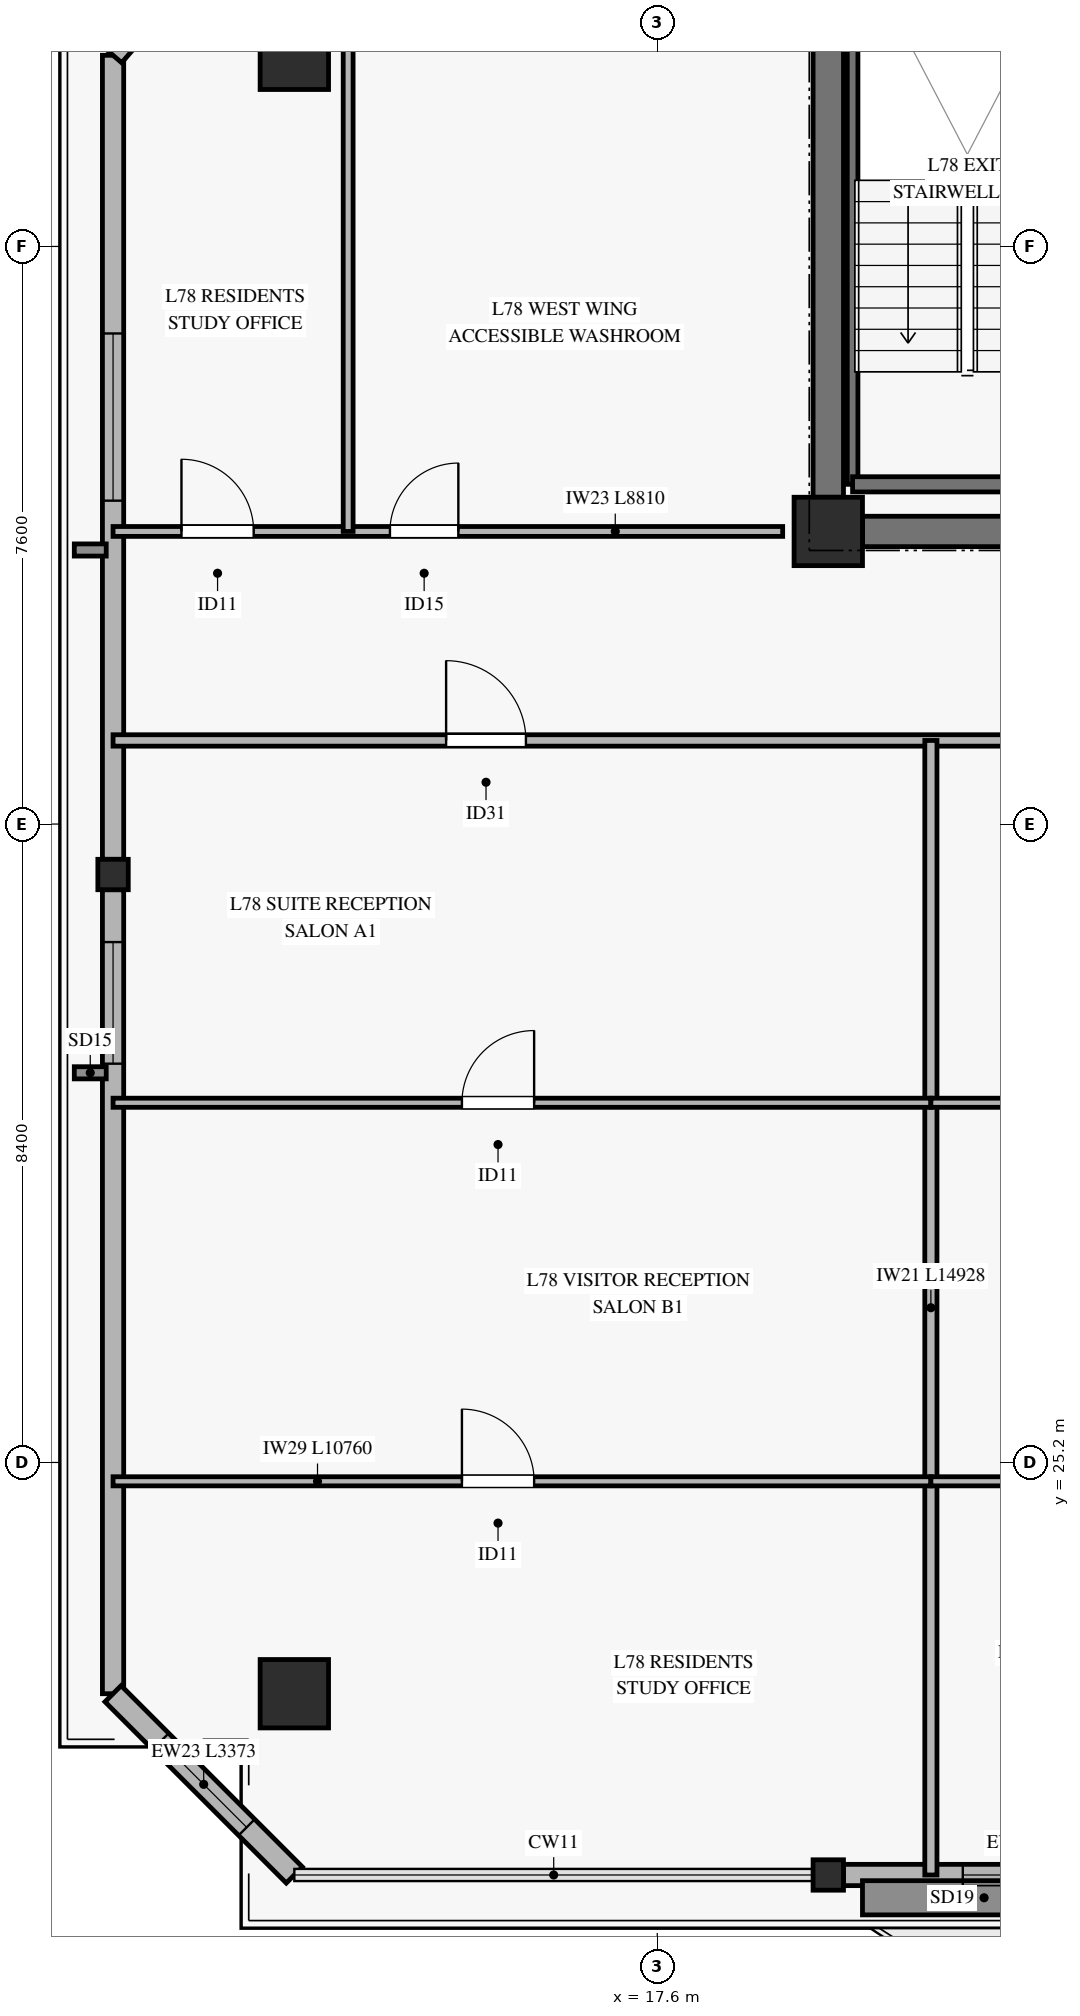
"""IFC4 building model, lengths in metres.
Left out: names, types, materials, properties, quantities, classifications, styles, units other than length and angle.
Written with IfcOpenShell. Run it as: python <this file> out.ifc"""

import sys

from ifc_helpers import new_model, si_unit, direction, frame, frame_2d, origin, origin_2d, place, context, subcontext, project, spatial, rectangle, hollow_rectangle, extrude, source, transform, mapped, element, fill, save


model = new_model("IFC4")
c1 = context("Model", 3, precision=1e-05, world=origin(), true_north=direction((0.0, 1.0)))
c2 = subcontext(c1, "Body", "Model", "MODEL_VIEW")
j1 = project(units=[si_unit("LENGTHUNIT", "METRE"), si_unit("PLANEANGLEUNIT", "RADIAN")], contexts=[c1])
p1 = place(None, origin())
s1 = spatial("IfcSite", under=j1, at=p1, CompositionType="ELEMENT")
p2 = place(p1, origin())
s2 = spatial("IfcBuilding", under=s1, at=p2, CompositionType="ELEMENT")
p3 = place(p2, frame((0.0, 0.0, 304.0)))
s3 = spatial("IfcBuildingStorey", under=s2, at=p3, CompositionType="ELEMENT", Elevation=304.0)
m1 = source(origin(), c2, "Body", "SweptSolid", [
    extrude(rectangle(XDim=0.9, YDim=0.9, at=origin_2d()), origin(), (0.0, 0.0, 1.0), 3.185),
])
p4 = place(p3, frame((19.85, 37.45, 0.0), z_axis=(0.0, 0.0, 1.0), x_axis=(1.0, 0.0, 0.0)))
e1 = element("IfcColumn", 1, at=p4, inside=s3, PredefinedType="PILASTER", context=c2, shape_type="MappedRepresentation", body=[
    mapped(m1, transform((0.0, 0.0, 0.0), x_axis=(1.0, 0.0, 0.0), y_axis=(0.0, 1.0, 0.0), z_axis=(0.0, 0.0, 1.0), scale=1.0)),
])
p5 = place(p3, frame((20.3, 37.45, 0.0), z_axis=(0.0, 0.0, 1.0), x_axis=(1.0, 0.0, 0.0)))
e2 = element("IfcWall", 2, at=p5, inside=s3, PredefinedType="SHEAR", context=c2, shape_type="SweptSolid", body=[
    extrude(rectangle(XDim=10.05, YDim=0.4, at=frame_2d((5.025, 0.0))), origin(), (0.0, 0.0, 1.0), 3.185),
])
p6 = place(p5, frame((4.25, 0.0, 0.0)))
e3 = element("IfcOpeningElement", 3, at=p6, cuts=e2, PredefinedType="OPENING", context=c2, shape_type="SweptSolid", body=[
    extrude(rectangle(XDim=1.2, YDim=2.15, at=frame_2d((0.6, 1.075))), frame((0.0, 0.21, 0.0), z_axis=(0.0, -1.0, 0.0), x_axis=(1.0, 0.0, 0.0)), (0.0, 0.0, 1.0), 0.42),
])
p7 = place(p3, frame((19.85, 37.9, 0.0), z_axis=(0.0, 0.0, 1.0), x_axis=(0.0, 1.0, 0.0)))
e4 = element("IfcWall", 4, at=p7, inside=s3, PredefinedType="SHEAR", context=c2, shape_type="SweptSolid", body=[
    extrude(rectangle(XDim=8.2, YDim=0.4, at=frame_2d((4.1, 0.0))), origin(), (0.0, 0.0, 1.0), 3.185),
])
m2 = source(origin(), c2, "Body", "SweptSolid", [
    extrude(hollow_rectangle(XDim=0.9, YDim=0.9, WallThickness=0.04, at=origin_2d()), origin(), (0.0, 0.0, 1.0), 3.185),
])
for number, where, z_axis, x_axis in (
    (5, (12.825, 22.157, 0.0), (0.0, 0.0, 1.0), (1.0, 0.0, 0.0)),
    (6, (12.825, 43.715, 0.0), (0.0, 0.0, 1.0), (1.0, 0.0, 0.0)),
):
    element("IfcColumn", number, at=place(p3, frame(where, z_axis=z_axis, x_axis=x_axis)), inside=s3, PredefinedType="COLUMN", context=c2, shape_type="MappedRepresentation", body=[
        mapped(m2, transform((0.0, 0.0, 0.0), x_axis=(1.0, 0.0, 0.0), y_axis=(0.0, 1.0, 0.0), z_axis=(0.0, 0.0, 1.0), scale=1.0)),
    ])
m3 = source(origin(), c2, "Body", "SweptSolid", [
    extrude(hollow_rectangle(XDim=0.4, YDim=0.4, WallThickness=0.02, at=origin_2d()), origin(), (0.0, 0.0, 1.0), 3.185),
])
for number, where, z_axis, x_axis in (
    (7, (19.85, 19.772, 0.0), (0.0, 0.0, 1.0), (1.0, 0.0, 0.0)),
    (8, (10.44, 32.936, 0.0), (0.0, 0.0, 1.0), (1.0, 0.0, 0.0)),
):
    element("IfcColumn", number, at=place(p3, frame(where, z_axis=z_axis, x_axis=x_axis)), inside=s3, PredefinedType="COLUMN", context=c2, shape_type="MappedRepresentation", body=[
        mapped(m3, transform((0.0, 0.0, 0.0), x_axis=(1.0, 0.0, 0.0), y_axis=(0.0, 1.0, 0.0), z_axis=(0.0, 0.0, 1.0), scale=1.0)),
    ])
p8 = place(p3, frame((20.05, 19.772, 0.0), z_axis=(0.0, 0.0, 1.0), x_axis=(1.0, 0.0, 0.0)))
e9 = element("IfcWall", 9, at=p8, inside=s3, PredefinedType="SOLIDWALL", context=c2, shape_type="SweptSolid", body=[
    extrude(rectangle(XDim=10.55, YDim=0.28, at=frame_2d((5.275, 0.0))), origin(), (0.0, 0.0, 1.0), 2.815),
])
p9 = place(p8, frame((4.35, 0.0, 0.0)))
e10 = element("IfcOpeningElement", 10, at=p9, cuts=e9, PredefinedType="OPENING", context=c2, shape_type="SweptSolid", body=[
    extrude(rectangle(XDim=1.8, YDim=2.25, at=frame_2d((0.9, 1.125))), frame((0.0, 0.15, 0.0), z_axis=(0.0, -1.0, 0.0), x_axis=(1.0, 0.0, 0.0)), (0.0, 0.0, 1.0), 0.3),
])
p10 = place(p8, frame((1.57, 0.0, 0.45)))
e11 = element("IfcOpeningElement", 11, at=p10, cuts=e9, PredefinedType="OPENING", context=c2, shape_type="SweptSolid", body=[
    extrude(rectangle(XDim=2.2, YDim=2.1, at=frame_2d((1.1, 1.05))), frame((0.0, 0.15, 0.0), z_axis=(0.0, -1.0, 0.0), x_axis=(1.0, 0.0, 0.0)), (0.0, 0.0, 1.0), 0.3),
])
p11 = place(p8, frame((7.35, 0.0, 0.45)))
e12 = element("IfcOpeningElement", 12, at=p11, cuts=e9, PredefinedType="OPENING", context=c2, shape_type="SweptSolid", body=[
    extrude(rectangle(XDim=1.6, YDim=2.0, at=frame_2d((0.8, 1.0))), frame((0.0, 0.15, 0.0), z_axis=(0.0, -1.0, 0.0), x_axis=(1.0, 0.0, 0.0)), (0.0, 0.0, 1.0), 0.3),
])
p12 = place(p3, frame((10.44, 22.157, 0.0), z_axis=(0.0, 0.0, 1.0), x_axis=(0.0, 1.0, 0.0)))
e13 = element("IfcWall", 13, at=p12, inside=s3, PredefinedType="SOLIDWALL", context=c2, shape_type="SweptSolid", body=[
    extrude(rectangle(XDim=10.579, YDim=0.28, at=frame_2d((5.29, 0.0))), origin(), (0.0, 0.0, 1.0), 2.815),
])
p13 = place(p12, frame((8.29, 0.0, 0.45)))
e14 = element("IfcOpeningElement", 14, at=p13, cuts=e13, PredefinedType="OPENING", context=c2, shape_type="SweptSolid", body=[
    extrude(rectangle(XDim=1.6, YDim=2.0, at=frame_2d((0.8, 1.0))), frame((0.0, 0.15, 0.0), z_axis=(0.0, -1.0, 0.0), x_axis=(1.0, 0.0, 0.0)), (0.0, 0.0, 1.0), 0.3),
])
p14 = place(p3, frame((10.44, 33.136, 0.0), z_axis=(0.0, 0.0, 1.0), x_axis=(0.0, 1.0, 0.0)))
e15 = element("IfcWall", 15, at=p14, inside=s3, PredefinedType="SOLIDWALL", context=c2, shape_type="SweptSolid", body=[
    extrude(rectangle(XDim=10.579, YDim=0.28, at=frame_2d((5.29, 0.0))), origin(), (0.0, 0.0, 1.0), 2.815),
])
p15 = place(p14, frame((4.719, 0.0, 0.45)))
e16 = element("IfcOpeningElement", 16, at=p15, cuts=e15, PredefinedType="OPENING", context=c2, shape_type="SweptSolid", body=[
    extrude(rectangle(XDim=2.2, YDim=2.1, at=frame_2d((1.1, 1.05))), frame((0.0, 0.15, 0.0), z_axis=(0.0, -1.0, 0.0), x_axis=(1.0, 0.0, 0.0)), (0.0, 0.0, 1.0), 0.3),
])
p16 = place(p3, frame((10.44, 22.157, 0.0), z_axis=(0.0, 0.0, 1.0), x_axis=(0.707106781187, -0.707106781187, 0.0)))
e17 = element("IfcWall", 17, at=p16, inside=s3, PredefinedType="SOLIDWALL", context=c2, shape_type="SweptSolid", body=[
    extrude(rectangle(XDim=3.373, YDim=0.3, at=frame_2d((1.687, 0.0))), origin(), (0.0, 0.0, 1.0), 2.815),
])
p17 = place(p16, frame((0.886, 0.0, 0.45)))
e18 = element("IfcOpeningElement", 18, at=p17, cuts=e17, PredefinedType="OPENING", context=c2, shape_type="SweptSolid", body=[
    extrude(rectangle(XDim=1.6, YDim=2.0, at=frame_2d((0.8, 1.0))), frame((0.0, 0.16, 0.0), z_axis=(0.0, -1.0, 0.0), x_axis=(1.0, 0.0, 0.0)), (0.0, 0.0, 1.0), 0.32),
])
p18 = place(p3, frame((12.625, 46.25, 0.0), z_axis=(0.0, 0.0, 1.0), x_axis=(-0.652903544361, -0.757441061576, 0.0)))
e19 = element("IfcWall", 19, at=p18, inside=s3, PredefinedType="SOLIDWALL", context=c2, shape_type="SweptSolid", body=[
    extrude(rectangle(XDim=3.347, YDim=0.3, at=frame_2d((1.673, 0.0))), origin(), (0.0, 0.0, 1.0), 2.815),
])
p19 = place(p18, frame((0.873, 0.0, 0.45)))
e20 = element("IfcOpeningElement", 20, at=p19, cuts=e19, PredefinedType="OPENING", context=c2, shape_type="SweptSolid", body=[
    extrude(rectangle(XDim=1.6, YDim=2.0, at=frame_2d((0.8, 1.0))), frame((0.0, 0.16, 0.0), z_axis=(0.0, -1.0, 0.0), x_axis=(1.0, 0.0, 0.0)), (0.0, 0.0, 1.0), 0.32),
])
p20 = place(p3, frame((20.17, 38.07, 0.0), z_axis=(0.0, 0.0, 1.0), x_axis=(0.0, 1.0, 0.0)))
e21 = element("IfcWall", 21, at=p20, inside=s3, PredefinedType="SOLIDWALL", context=c2, shape_type="SweptSolid", body=[
    extrude(rectangle(XDim=7.25, YDim=0.14, at=frame_2d((3.625, 0.0))), origin(), (0.0, 0.0, 1.0), 3.4),
])
p21 = place(p3, frame((20.17, 38.07, 0.0), z_axis=(0.0, 0.0, 1.0), x_axis=(1.0, 0.0, 0.0)))
e22 = element("IfcWall", 22, at=p21, inside=s3, PredefinedType="SOLIDWALL", context=c2, shape_type="SweptSolid", body=[
    extrude(rectangle(XDim=3.05, YDim=0.2, at=frame_2d((1.525, 0.0))), origin(), (0.0, 0.0, 1.0), 3.4),
])
p22 = place(p3, frame((10.44, 34.7, 0.0), z_axis=(0.0, 0.0, 1.0), x_axis=(1.0, 0.0, 0.0)))
e23 = element("IfcWall", 23, at=p22, inside=s3, PredefinedType="PARTITIONING", context=c2, shape_type="SweptSolid", body=[
    extrude(rectangle(XDim=49.52, YDim=0.15, at=frame_2d((24.76, 0.0))), origin(), (0.0, 0.0, 1.0), 2.47),
])
p23 = place(p22, frame((4.382, 0.0, 0.0)))
e24 = element("IfcOpeningElement", 24, at=p23, cuts=e23, PredefinedType="OPENING", context=c2, shape_type="SweptSolid", body=[
    extrude(rectangle(XDim=1.05, YDim=2.15, at=frame_2d((0.525, 1.075))), frame((0.0, 0.085, 0.0), z_axis=(0.0, -1.0, 0.0), x_axis=(1.0, 0.0, 0.0)), (0.0, 0.0, 1.0), 0.17),
])
p24 = place(p22, frame((15.945, 0.0, 0.0)))
e25 = element("IfcOpeningElement", 25, at=p24, cuts=e23, PredefinedType="OPENING", context=c2, shape_type="SweptSolid", body=[
    extrude(rectangle(XDim=1.05, YDim=2.15, at=frame_2d((0.525, 1.075))), frame((0.0, 0.085, 0.0), z_axis=(0.0, -1.0, 0.0), x_axis=(1.0, 0.0, 0.0)), (0.0, 0.0, 1.0), 0.17),
])
p25 = place(p22, frame((28.233, 0.0, 0.0)))
e26 = element("IfcOpeningElement", 26, at=p25, cuts=e23, PredefinedType="OPENING", context=c2, shape_type="SweptSolid", body=[
    extrude(rectangle(XDim=1.05, YDim=2.15, at=frame_2d((0.525, 1.075))), frame((0.0, 0.085, 0.0), z_axis=(0.0, -1.0, 0.0), x_axis=(1.0, 0.0, 0.0)), (0.0, 0.0, 1.0), 0.17),
])
p26 = place(p22, frame((40.462, 0.0, 0.0)))
e27 = element("IfcOpeningElement", 27, at=p26, cuts=e23, PredefinedType="OPENING", context=c2, shape_type="SweptSolid", body=[
    extrude(rectangle(XDim=1.05, YDim=2.15, at=frame_2d((0.525, 1.075))), frame((0.0, 0.085, 0.0), z_axis=(0.0, -1.0, 0.0), x_axis=(1.0, 0.0, 0.0)), (0.0, 0.0, 1.0), 0.17),
])
p27 = place(p3, frame((21.2, 19.772, 0.0), z_axis=(0.0, 0.0, 1.0), x_axis=(0.0, 1.0, 0.0)))
e28 = element("IfcWall", 28, at=p27, inside=s3, PredefinedType="PARTITIONING", context=c2, shape_type="SweptSolid", body=[
    extrude(rectangle(XDim=14.928, YDim=0.16, at=frame_2d((7.464, 0.0))), origin(), (0.0, 0.0, 1.0), 2.77),
])
p28 = place(p3, frame((10.44, 24.952, 0.0), z_axis=(0.0, 0.0, 1.0), x_axis=(1.0, 0.0, 0.0)))
e29 = element("IfcWall", 29, at=p28, inside=s3, PredefinedType="PARTITIONING", context=c2, shape_type="SweptSolid", body=[
    extrude(rectangle(XDim=10.76, YDim=0.12, at=frame_2d((5.38, 0.0))), origin(), (0.0, 0.0, 1.0), 2.47),
])
p29 = place(p28, frame((4.59, 0.0, 0.0)))
e30 = element("IfcOpeningElement", 30, at=p29, cuts=e29, PredefinedType="OPENING", context=c2, shape_type="SweptSolid", body=[
    extrude(rectangle(XDim=0.95, YDim=2.1, at=frame_2d((0.475, 1.05))), frame((0.0, 0.07, 0.0), z_axis=(0.0, -1.0, 0.0), x_axis=(1.0, 0.0, 0.0)), (0.0, 0.0, 1.0), 0.14),
])
p30 = place(p3, frame((10.44, 29.933, 0.0), z_axis=(0.0, 0.0, 1.0), x_axis=(1.0, 0.0, 0.0)))
e31 = element("IfcWall", 31, at=p30, inside=s3, PredefinedType="PARTITIONING", context=c2, shape_type="SweptSolid", body=[
    extrude(rectangle(XDim=10.76, YDim=0.12, at=frame_2d((5.38, 0.0))), origin(), (0.0, 0.0, 1.0), 2.47),
])
p31 = place(p30, frame((4.59, 0.0, 0.0)))
e32 = element("IfcOpeningElement", 32, at=p31, cuts=e31, PredefinedType="OPENING", context=c2, shape_type="SweptSolid", body=[
    extrude(rectangle(XDim=0.95, YDim=2.1, at=frame_2d((0.475, 1.05))), frame((0.0, 0.07, 0.0), z_axis=(0.0, -1.0, 0.0), x_axis=(1.0, 0.0, 0.0)), (0.0, 0.0, 1.0), 0.14),
])
p32 = place(p3, frame((21.2, 24.952, 0.0), z_axis=(0.0, 0.0, 1.0), x_axis=(1.0, 0.0, 0.0)))
e33 = element("IfcWall", 33, at=p32, inside=s3, PredefinedType="PARTITIONING", context=c2, shape_type="SweptSolid", body=[
    extrude(rectangle(XDim=13.2, YDim=0.12, at=frame_2d((6.6, 0.0))), origin(), (0.0, 0.0, 1.0), 2.47),
])
p33 = place(p32, frame((5.446, 0.0, 0.0)))
e34 = element("IfcOpeningElement", 34, at=p33, cuts=e33, PredefinedType="OPENING", context=c2, shape_type="SweptSolid", body=[
    extrude(rectangle(XDim=0.95, YDim=2.1, at=frame_2d((0.475, 1.05))), frame((0.0, 0.07, 0.0), z_axis=(0.0, -1.0, 0.0), x_axis=(1.0, 0.0, 0.0)), (0.0, 0.0, 1.0), 0.14),
])
p34 = place(p3, frame((21.2, 29.933, 0.0), z_axis=(0.0, 0.0, 1.0), x_axis=(1.0, 0.0, 0.0)))
e35 = element("IfcWall", 35, at=p34, inside=s3, PredefinedType="PARTITIONING", context=c2, shape_type="SweptSolid", body=[
    extrude(rectangle(XDim=13.2, YDim=0.12, at=frame_2d((6.6, 0.0))), origin(), (0.0, 0.0, 1.0), 2.47),
])
p35 = place(p34, frame((5.446, 0.0, 0.0)))
e36 = element("IfcOpeningElement", 36, at=p35, cuts=e35, PredefinedType="OPENING", context=c2, shape_type="SweptSolid", body=[
    extrude(rectangle(XDim=0.95, YDim=2.1, at=frame_2d((0.475, 1.05))), frame((0.0, 0.07, 0.0), z_axis=(0.0, -1.0, 0.0), x_axis=(1.0, 0.0, 0.0)), (0.0, 0.0, 1.0), 0.14),
])
p36 = place(p3, frame((10.44, 37.45, 0.0), z_axis=(0.0, 0.0, 1.0), x_axis=(1.0, 0.0, 0.0)))
e37 = element("IfcWall", 37, at=p36, inside=s3, PredefinedType="PARTITIONING", context=c2, shape_type="SweptSolid", body=[
    extrude(rectangle(XDim=8.81, YDim=0.13, at=frame_2d((4.405, 0.0))), origin(), (0.0, 0.0, 1.0), 2.82),
])
p37 = place(p36, frame((0.9, 0.0, 0.0)))
e38 = element("IfcOpeningElement", 38, at=p37, cuts=e37, PredefinedType="OPENING", context=c2, shape_type="SweptSolid", body=[
    extrude(rectangle(XDim=0.95, YDim=2.1, at=frame_2d((0.475, 1.05))), frame((0.0, 0.075, 0.0), z_axis=(0.0, -1.0, 0.0), x_axis=(1.0, 0.0, 0.0)), (0.0, 0.0, 1.0), 0.15),
])
p38 = place(p36, frame((3.643, 0.0, 0.0)))
e39 = element("IfcOpeningElement", 39, at=p38, cuts=e37, PredefinedType="OPENING", context=c2, shape_type="SweptSolid", body=[
    extrude(rectangle(XDim=0.9, YDim=2.1, at=frame_2d((0.45, 1.05))), frame((0.0, 0.075, 0.0), z_axis=(0.0, -1.0, 0.0), x_axis=(1.0, 0.0, 0.0)), (0.0, 0.0, 1.0), 0.15),
])
p39 = place(p3, frame((13.533, 37.45, 0.0), z_axis=(0.0, 0.0, 1.0), x_axis=(0.0, 1.0, 0.0)))
e40 = element("IfcWall", 40, at=p39, inside=s3, PredefinedType="PARTITIONING", context=c2, shape_type="SweptSolid", body=[
    extrude(rectangle(XDim=8.8, YDim=0.13, at=frame_2d((4.4, 0.0))), origin(), (0.0, 0.0, 1.0), 3.185),
])
m4 = source(origin(), c2, "Body", "SweptSolid", [
    extrude(rectangle(XDim=2.2, YDim=2.1, at=frame_2d((1.1, 1.05))), frame((0.0, 0.03, 0.0), z_axis=(0.0, -1.0, 0.0), x_axis=(1.0, 0.0, 0.0)), (0.0, 0.0, 1.0), 0.06),
])
p40 = place(p10, origin())
e41 = element("IfcWindow", 41, at=p40, inside=s3, PartitioningType="SINGLE_PANEL", PredefinedType="WINDOW", context=c2, shape_type="MappedRepresentation", body=[
    mapped(m4, transform((0.0, 0.0, 0.0), x_axis=(1.0, 0.0, 0.0), y_axis=(0.0, 1.0, 0.0), z_axis=(0.0, 0.0, 1.0), scale=1.0)),
])
fill(e11, e41)
m5 = source(origin(), c2, "Body", "SweptSolid", [
    extrude(rectangle(XDim=1.6, YDim=2.0, at=frame_2d((0.8, 1.0))), frame((0.0, 0.03, 0.0), z_axis=(0.0, -1.0, 0.0), x_axis=(1.0, 0.0, 0.0)), (0.0, 0.0, 1.0), 0.06),
])
p41 = place(p13, origin())
e42 = element("IfcWindow", 42, at=p41, inside=s3, PartitioningType="SINGLE_PANEL", PredefinedType="WINDOW", context=c2, shape_type="MappedRepresentation", body=[
    mapped(m5, transform((0.0, 0.0, 0.0), x_axis=(1.0, 0.0, 0.0), y_axis=(0.0, 1.0, 0.0), z_axis=(0.0, 0.0, 1.0), scale=1.0)),
])
fill(e14, e42)
p42 = place(p15, origin())
e43 = element("IfcWindow", 43, at=p42, inside=s3, PartitioningType="SINGLE_PANEL", PredefinedType="WINDOW", context=c2, shape_type="MappedRepresentation", body=[
    mapped(m4, transform((0.0, 0.0, 0.0), x_axis=(1.0, 0.0, 0.0), y_axis=(0.0, 1.0, 0.0), z_axis=(0.0, 0.0, 1.0), scale=1.0)),
])
fill(e16, e43)
p43 = place(p17, origin())
e44 = element("IfcWindow", 44, at=p43, inside=s3, PartitioningType="SINGLE_PANEL", PredefinedType="WINDOW", context=c2, shape_type="MappedRepresentation", body=[
    mapped(m5, transform((0.0, 0.0, 0.0), x_axis=(1.0, 0.0, 0.0), y_axis=(0.0, 1.0, 0.0), z_axis=(0.0, 0.0, 1.0), scale=1.0)),
])
fill(e18, e44)
m6 = source(origin(), c2, "Body", "SweptSolid", [
    extrude(rectangle(XDim=1.05, YDim=2.15, at=frame_2d((0.525, 1.075))), frame((0.0, 0.025, 0.0), z_axis=(0.0, -1.0, 0.0), x_axis=(1.0, 0.0, 0.0)), (0.0, 0.0, 1.0), 0.05),
])
p44 = place(p23, origin())
e45 = element("IfcDoor", 45, at=p44, inside=s3, OperationType="SINGLE_SWING_LEFT", PredefinedType="DOOR", context=c2, shape_type="MappedRepresentation", body=[
    mapped(m6, transform((0.0, 0.0, 0.0), x_axis=(1.0, 0.0, 0.0), y_axis=(0.0, 1.0, 0.0), z_axis=(0.0, 0.0, 1.0), scale=1.0)),
])
fill(e24, e45)
m7 = source(origin(), c2, "Body", "SweptSolid", [
    extrude(rectangle(XDim=0.95, YDim=2.1, at=frame_2d((0.475, 1.05))), frame((0.0, 0.025, 0.0), z_axis=(0.0, -1.0, 0.0), x_axis=(1.0, 0.0, 0.0)), (0.0, 0.0, 1.0), 0.05),
])
p45 = place(p31, origin())
e46 = element("IfcDoor", 46, at=p45, inside=s3, OperationType="SINGLE_SWING_RIGHT", PredefinedType="DOOR", context=c2, shape_type="MappedRepresentation", body=[
    mapped(m7, transform((0.0, 0.0, 0.0), x_axis=(1.0, 0.0, 0.0), y_axis=(0.0, 1.0, 0.0), z_axis=(0.0, 0.0, 1.0), scale=1.0)),
])
fill(e32, e46)
p46 = place(p29, origin())
e47 = element("IfcDoor", 47, at=p46, inside=s3, OperationType="SINGLE_SWING_LEFT", PredefinedType="DOOR", context=c2, shape_type="MappedRepresentation", body=[
    mapped(m7, transform((0.0, 0.0, 0.0), x_axis=(1.0, 0.0, 0.0), y_axis=(0.0, 1.0, 0.0), z_axis=(0.0, 0.0, 1.0), scale=1.0)),
])
fill(e30, e47)
p47 = place(p37, origin())
e48 = element("IfcDoor", 48, at=p47, inside=s3, OperationType="SINGLE_SWING_LEFT", PredefinedType="DOOR", context=c2, shape_type="MappedRepresentation", body=[
    mapped(m7, transform((0.0, 0.0, 0.0), x_axis=(1.0, 0.0, 0.0), y_axis=(0.0, 1.0, 0.0), z_axis=(0.0, 0.0, 1.0), scale=1.0)),
])
fill(e38, e48)
m8 = source(origin(), c2, "Body", "SweptSolid", [
    extrude(rectangle(XDim=0.9, YDim=2.1, at=frame_2d((0.45, 1.05))), frame((0.0, 0.025, 0.0), z_axis=(0.0, -1.0, 0.0), x_axis=(1.0, 0.0, 0.0)), (0.0, 0.0, 1.0), 0.05),
])
p48 = place(p38, origin())
e49 = element("IfcDoor", 49, at=p48, inside=s3, OperationType="SINGLE_SWING_RIGHT", PredefinedType="DOOR", context=c2, shape_type="MappedRepresentation", body=[
    mapped(m8, transform((0.0, 0.0, 0.0), x_axis=(1.0, 0.0, 0.0), y_axis=(0.0, 1.0, 0.0), z_axis=(0.0, 0.0, 1.0), scale=1.0)),
])
fill(e39, e49)
save(model, sys.argv[1])
